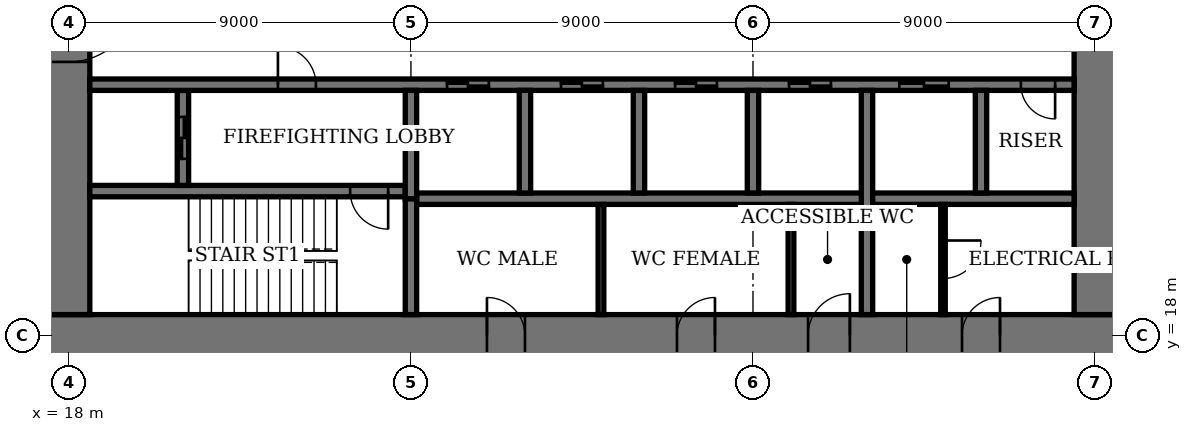
"""IFC4 building model, lengths in metres.
Left out: names, types, materials, properties, quantities, classifications, styles, units other than length and angle.
Written with IfcOpenShell. Run it as: python <this file> out.ifc"""

import sys

from ifc_helpers import new_model, si_unit, direction, frame, frame_2d, origin, place, context, subcontext, project, spatial, rectangle, extrude, element, fill, save


model = new_model("IFC4")
c1 = context("Model", 3, precision=1e-05, world=origin(), true_north=direction((0.0, 1.0)))
c2 = subcontext(c1, "Body", "Model", "MODEL_VIEW")
j1 = project(units=[si_unit("LENGTHUNIT", "METRE"), si_unit("PLANEANGLEUNIT", "RADIAN")], contexts=[c1])
p1 = place(None, origin())
s1 = spatial("IfcSite", under=j1, at=p1, CompositionType="ELEMENT")
p2 = place(p1, origin())
s2 = spatial("IfcBuilding", under=s1, at=p2, CompositionType="ELEMENT")
p3 = place(p2, frame((0.0, 0.0, 27.8)))
s3 = spatial("IfcBuildingStorey", under=s2, at=p3, CompositionType="ELEMENT", Elevation=27.8)
p4 = place(p3, frame((17.45, 18.0, 0.0), z_axis=(0.0, 0.0, 1.0), x_axis=(1.0, 0.0, 0.0)))
e1 = element("IfcWall", 1, at=p4, inside=s3, PredefinedType="SHEAR", context=c2, shape_type="SweptSolid", body=[
    extrude(rectangle(XDim=28.1, YDim=1.1, at=frame_2d((14.05, 0.0))), origin(), (0.0, 0.0, 1.0), 4.0),
])
p5 = place(p4, frame((11.55, 0.0, 0.0)))
e2 = element("IfcOpeningElement", 2, at=p5, cuts=e1, PredefinedType="OPENING", context=c2, shape_type="SweptSolid", body=[
    extrude(rectangle(XDim=1.0, YDim=2.4, at=frame_2d((0.5, 1.2))), frame((0.0, 0.56, 0.0), z_axis=(0.0, -1.0, 0.0), x_axis=(1.0, 0.0, 0.0)), (0.0, 0.0, 1.0), 1.12),
])
p6 = place(p4, frame((16.55, 0.0, 0.0)))
e3 = element("IfcOpeningElement", 3, at=p6, cuts=e1, PredefinedType="OPENING", context=c2, shape_type="SweptSolid", body=[
    extrude(rectangle(XDim=1.0, YDim=2.4, at=frame_2d((0.5, 1.2))), frame((0.0, 0.56, 0.0), z_axis=(0.0, -1.0, 0.0), x_axis=(1.0, 0.0, 0.0)), (0.0, 0.0, 1.0), 1.12),
])
p7 = place(p4, frame((20.0, 0.0, 0.0)))
e4 = element("IfcOpeningElement", 4, at=p7, cuts=e1, PredefinedType="OPENING", context=c2, shape_type="SweptSolid", body=[
    extrude(rectangle(XDim=1.1, YDim=2.4, at=frame_2d((0.55, 1.2))), frame((0.0, 0.56, 0.0), z_axis=(0.0, -1.0, 0.0), x_axis=(1.0, 0.0, 0.0)), (0.0, 0.0, 1.0), 1.12),
])
p8 = place(p4, frame((24.05, 0.0, 0.0)))
e5 = element("IfcOpeningElement", 5, at=p8, cuts=e1, PredefinedType="OPENING", context=c2, shape_type="SweptSolid", body=[
    extrude(rectangle(XDim=1.0, YDim=2.4, at=frame_2d((0.5, 1.2))), frame((0.0, 0.56, 0.0), z_axis=(0.0, -1.0, 0.0), x_axis=(1.0, 0.0, 0.0)), (0.0, 0.0, 1.0), 1.12),
])
p9 = place(p3, frame((18.0, 35.45, 0.0), z_axis=(0.0, 0.0, 1.0), x_axis=(0.0, -1.0, 0.0)))
e6 = element("IfcWall", 6, at=p9, inside=s3, PredefinedType="SHEAR", context=c2, shape_type="SweptSolid", body=[
    extrude(rectangle(XDim=16.9, YDim=1.1, at=frame_2d((8.45, 0.0))), origin(), (0.0, 0.0, 1.0), 4.0),
])
p10 = place(p9, frame((8.45, 0.0, 0.0)))
e7 = element("IfcOpeningElement", 7, at=p10, cuts=e6, PredefinedType="OPENING", context=c2, shape_type="SweptSolid", body=[
    extrude(rectangle(XDim=1.8, YDim=2.4, at=frame_2d((0.9, 1.2))), frame((0.0, 0.56, 0.0), z_axis=(0.0, -1.0, 0.0), x_axis=(1.0, 0.0, 0.0)), (0.0, 0.0, 1.0), 1.12),
])
p11 = place(p3, frame((45.0, 18.55, 0.0), z_axis=(0.0, 0.0, 1.0), x_axis=(0.0, 1.0, 0.0)))
e8 = element("IfcWall", 8, at=p11, inside=s3, PredefinedType="SHEAR", context=c2, shape_type="SweptSolid", body=[
    extrude(rectangle(XDim=16.9, YDim=1.1, at=frame_2d((8.45, 0.0))), origin(), (0.0, 0.0, 1.0), 4.0),
])
p12 = place(p11, frame((8.45, 0.0, 0.0)))
e9 = element("IfcOpeningElement", 9, at=p12, cuts=e8, PredefinedType="OPENING", context=c2, shape_type="SweptSolid", body=[
    extrude(rectangle(XDim=1.8, YDim=2.4, at=frame_2d((0.9, 1.2))), frame((0.0, 0.56, 0.0), z_axis=(0.0, -1.0, 0.0), x_axis=(1.0, 0.0, 0.0)), (0.0, 0.0, 1.0), 1.12),
])
p13 = place(p3, frame((18.55, 21.8, 0.0), z_axis=(0.0, 0.0, 1.0), x_axis=(1.0, 0.0, 0.0)))
e10 = element("IfcWall", 10, at=p13, inside=s3, PredefinedType="SHEAR", context=c2, shape_type="SweptSolid", body=[
    extrude(rectangle(XDim=8.3, YDim=0.3, at=frame_2d((4.15, 0.0))), origin(), (0.0, 0.0, 1.0), 4.0),
])
p14 = place(p13, frame((6.85, 0.0, 0.0)))
e11 = element("IfcOpeningElement", 11, at=p14, cuts=e10, PredefinedType="OPENING", context=c2, shape_type="SweptSolid", body=[
    extrude(rectangle(XDim=1.0, YDim=2.4, at=frame_2d((0.5, 1.2))), frame((0.0, 0.16, 0.0), z_axis=(0.0, -1.0, 0.0), x_axis=(1.0, 0.0, 0.0)), (0.0, 0.0, 1.0), 0.32),
])
p15 = place(p3, frame((27.0, 18.55, 0.0), z_axis=(0.0, 0.0, 1.0), x_axis=(0.0, 1.0, 0.0)))
e12 = element("IfcWall", 12, at=p15, inside=s3, PredefinedType="SHEAR", context=c2, shape_type="SweptSolid", body=[
    extrude(rectangle(XDim=3.05, YDim=0.3, at=frame_2d((1.525, 0.0))), origin(), (0.0, 0.0, 1.0), 4.0),
])
p16 = place(p3, frame((21.0, 21.95, 0.0), z_axis=(0.0, 0.0, 1.0), x_axis=(0.0, 1.0, 0.0)))
e13 = element("IfcWall", 13, at=p16, inside=s3, PredefinedType="SHEAR", context=c2, shape_type="SweptSolid", body=[
    extrude(rectangle(XDim=2.5, YDim=0.3, at=frame_2d((1.25, 0.0))), origin(), (0.0, 0.0, 1.0), 4.0),
])
p17 = place(p16, frame((0.7, 0.0, 0.0)))
e14 = element("IfcOpeningElement", 14, at=p17, cuts=e13, PredefinedType="OPENING", context=c2, shape_type="SweptSolid", body=[
    extrude(rectangle(XDim=1.1, YDim=2.4, at=frame_2d((0.55, 1.2))), frame((0.0, 0.16, 0.0), z_axis=(0.0, -1.0, 0.0), x_axis=(1.0, 0.0, 0.0)), (0.0, 0.0, 1.0), 0.32),
])
p18 = place(p3, frame((18.55, 24.6, 0.0), z_axis=(0.0, 0.0, 1.0), x_axis=(1.0, 0.0, 0.0)))
e15 = element("IfcWall", 15, at=p18, inside=s3, PredefinedType="SHEAR", context=c2, shape_type="SweptSolid", body=[
    extrude(rectangle(XDim=25.9, YDim=0.3, at=frame_2d((12.95, 0.0))), origin(), (0.0, 0.0, 1.0), 4.0),
])
p19 = place(p18, frame((4.95, 0.0, 0.0)))
e16 = element("IfcOpeningElement", 16, at=p19, cuts=e15, PredefinedType="OPENING", context=c2, shape_type="SweptSolid", body=[
    extrude(rectangle(XDim=1.0, YDim=2.4, at=frame_2d((0.5, 1.2))), frame((0.0, 0.16, 0.0), z_axis=(0.0, -1.0, 0.0), x_axis=(1.0, 0.0, 0.0)), (0.0, 0.0, 1.0), 0.32),
])
p20 = place(p18, frame((24.5, 0.0, 0.0)))
e17 = element("IfcOpeningElement", 17, at=p20, cuts=e15, PredefinedType="OPENING", context=c2, shape_type="SweptSolid", body=[
    extrude(rectangle(XDim=0.9, YDim=2.1, at=frame_2d((0.45, 1.05))), frame((0.0, 0.16, 0.0), z_axis=(0.0, -1.0, 0.0), x_axis=(1.0, 0.0, 0.0)), (0.0, 0.0, 1.0), 0.32),
])
p21 = place(p18, frame((9.4, 0.0, 0.0)))
e18 = element("IfcOpeningElement", 18, at=p21, cuts=e15, PredefinedType="OPENING", context=c2, shape_type="SweptSolid", body=[
    extrude(rectangle(XDim=1.1, YDim=2.4, at=frame_2d((0.55, 1.2))), frame((0.0, 0.16, 0.0), z_axis=(0.0, -1.0, 0.0), x_axis=(1.0, 0.0, 0.0)), (0.0, 0.0, 1.0), 0.32),
])
p22 = place(p18, frame((12.4, 0.0, 0.0)))
e19 = element("IfcOpeningElement", 19, at=p22, cuts=e15, PredefinedType="OPENING", context=c2, shape_type="SweptSolid", body=[
    extrude(rectangle(XDim=1.1, YDim=2.4, at=frame_2d((0.55, 1.2))), frame((0.0, 0.16, 0.0), z_axis=(0.0, -1.0, 0.0), x_axis=(1.0, 0.0, 0.0)), (0.0, 0.0, 1.0), 0.32),
])
p23 = place(p18, frame((15.4, 0.0, 0.0)))
e20 = element("IfcOpeningElement", 20, at=p23, cuts=e15, PredefinedType="OPENING", context=c2, shape_type="SweptSolid", body=[
    extrude(rectangle(XDim=1.1, YDim=2.4, at=frame_2d((0.55, 1.2))), frame((0.0, 0.16, 0.0), z_axis=(0.0, -1.0, 0.0), x_axis=(1.0, 0.0, 0.0)), (0.0, 0.0, 1.0), 0.32),
])
p24 = place(p18, frame((18.4, 0.0, 0.0)))
e21 = element("IfcOpeningElement", 21, at=p24, cuts=e15, PredefinedType="OPENING", context=c2, shape_type="SweptSolid", body=[
    extrude(rectangle(XDim=1.1, YDim=2.4, at=frame_2d((0.55, 1.2))), frame((0.0, 0.16, 0.0), z_axis=(0.0, -1.0, 0.0), x_axis=(1.0, 0.0, 0.0)), (0.0, 0.0, 1.0), 0.32),
])
p25 = place(p18, frame((21.3, 0.0, 0.0)))
e22 = element("IfcOpeningElement", 22, at=p25, cuts=e15, PredefinedType="OPENING", context=c2, shape_type="SweptSolid", body=[
    extrude(rectangle(XDim=1.3, YDim=2.4, at=frame_2d((0.65, 1.2))), frame((0.0, 0.16, 0.0), z_axis=(0.0, -1.0, 0.0), x_axis=(1.0, 0.0, 0.0)), (0.0, 0.0, 1.0), 0.32),
])
p26 = place(p3, frame((27.15, 21.6, 0.0), z_axis=(0.0, 0.0, 1.0), x_axis=(1.0, 0.0, 0.0)))
e23 = element("IfcWall", 23, at=p26, inside=s3, PredefinedType="SHEAR", context=c2, shape_type="SweptSolid", body=[
    extrude(rectangle(XDim=17.3, YDim=0.3, at=frame_2d((8.65, 0.0))), origin(), (0.0, 0.0, 1.0), 4.0),
])
for number, where, z_axis, x_axis in (
    (24, (30.0, 21.75, 0.0), (0.0, 0.0, 1.0), (0.0, 1.0, 0.0)),
    (25, (33.0, 21.75, 0.0), (0.0, 0.0, 1.0), (0.0, 1.0, 0.0)),
    (26, (36.0, 21.75, 0.0), (0.0, 0.0, 1.0), (0.0, 1.0, 0.0)),
):
    element("IfcWall", number, at=place(p3, frame(where, z_axis=z_axis, x_axis=x_axis)), inside=s3, PredefinedType="SHEAR", context=c2, shape_type="SweptSolid", body=[
        extrude(rectangle(XDim=2.7, YDim=0.3, at=frame_2d((1.35, 0.0))), origin(), (0.0, 0.0, 1.0), 4.0),
    ])
p27 = place(p3, frame((39.0, 18.55, 0.0), z_axis=(0.0, 0.0, 1.0), x_axis=(0.0, 1.0, 0.0)))
e27 = element("IfcWall", 27, at=p27, inside=s3, PredefinedType="SHEAR", context=c2, shape_type="SweptSolid", body=[
    extrude(rectangle(XDim=5.9, YDim=0.3, at=frame_2d((2.95, 0.0))), origin(), (0.0, 0.0, 1.0), 4.0),
])
p28 = place(p3, frame((42.0, 21.75, 0.0), z_axis=(0.0, 0.0, 1.0), x_axis=(0.0, 1.0, 0.0)))
e28 = element("IfcWall", 28, at=p28, inside=s3, PredefinedType="SHEAR", context=c2, shape_type="SweptSolid", body=[
    extrude(rectangle(XDim=2.7, YDim=0.3, at=frame_2d((1.35, 0.0))), origin(), (0.0, 0.0, 1.0), 4.0),
])
p29 = place(p3, frame((27.0, 21.6, 0.0), z_axis=(0.0, 0.0, 1.0), x_axis=(0.0, 1.0, 0.0)))
e29 = element("IfcWall", 29, at=p29, inside=s3, PredefinedType="SHEAR", context=c2, shape_type="SweptSolid", body=[
    extrude(rectangle(XDim=2.85, YDim=0.3, at=frame_2d((1.425, 0.0))), origin(), (0.0, 0.0, 1.0), 4.0),
])
for number, where, z_axis, x_axis in (
    (30, (32.0, 18.55, 0.0), (0.0, 0.0, 1.0), (0.0, 1.0, 0.0)),
    (31, (37.0, 18.55, 0.0), (0.0, 0.0, 1.0), (0.0, 1.0, 0.0)),
):
    element("IfcWall", number, at=place(p3, frame(where, z_axis=z_axis, x_axis=x_axis)), inside=s3, PredefinedType="PARTITIONING", context=c2, shape_type="SweptSolid", body=[
        extrude(rectangle(XDim=2.9, YDim=0.15, at=frame_2d((1.45, 0.0))), origin(), (0.0, 0.0, 1.0), 3.75),
    ])
p30 = place(p3, frame((41.0, 18.55, 0.0), z_axis=(0.0, 0.0, 1.0), x_axis=(0.0, 1.0, 0.0)))
e32 = element("IfcWall", 32, at=p30, inside=s3, PredefinedType="PARTITIONING", context=c2, shape_type="SweptSolid", body=[
    extrude(rectangle(XDim=2.9, YDim=0.12, at=frame_2d((1.45, 0.0))), origin(), (0.0, 0.0, 1.0), 3.75),
])
p31 = place(p30, frame((0.95, 0.0, 0.0)))
e33 = element("IfcOpeningElement", 33, at=p31, cuts=e32, PredefinedType="OPENING", context=c2, shape_type="SweptSolid", body=[
    extrude(rectangle(XDim=1.0, YDim=2.4, at=frame_2d((0.5, 1.2))), frame((0.0, 0.07, 0.0), z_axis=(0.0, -1.0, 0.0), x_axis=(1.0, 0.0, 0.0)), (0.0, 0.0, 1.0), 0.14),
])
p32 = place(p10, origin())
e34 = element("IfcDoor", 34, at=p32, inside=s3, OperationType="DOUBLE_DOOR_DOUBLE_SWING", PredefinedType="DOOR", context=c2, shape_type="SweptSolid", body=[
    extrude(rectangle(XDim=1.8, YDim=2.4, at=frame_2d((0.9, 1.2))), frame((0.0, 0.03, 0.0), z_axis=(0.0, -1.0, 0.0), x_axis=(1.0, 0.0, 0.0)), (0.0, 0.0, 1.0), 0.06),
    extrude(rectangle(XDim=0.04, YDim=2.4, at=frame_2d((0.02, 1.2))), frame((0.0, 0.55, 0.0), z_axis=(0.0, -1.0, 0.0), x_axis=(1.0, 0.0, 0.0)), (0.0, 0.0, 1.0), 1.1),
    extrude(rectangle(XDim=0.04, YDim=2.4, at=frame_2d((1.78, 1.2))), frame((0.0, 0.55, 0.0), z_axis=(0.0, -1.0, 0.0), x_axis=(1.0, 0.0, 0.0)), (0.0, 0.0, 1.0), 1.1),
    extrude(rectangle(XDim=1.8, YDim=0.04, at=frame_2d((0.9, 2.38))), frame((0.0, 0.55, 0.0), z_axis=(0.0, -1.0, 0.0), x_axis=(1.0, 0.0, 0.0)), (0.0, 0.0, 1.0), 1.1),
])
fill(e7, e34)
p33 = place(p5, origin())
e35 = element("IfcDoor", 35, at=p33, inside=s3, OperationType="SINGLE_SWING_RIGHT", PredefinedType="DOOR", context=c2, shape_type="SweptSolid", body=[
    extrude(rectangle(XDim=1.0, YDim=2.4, at=frame_2d((0.5, 1.2))), frame((0.0, 0.025, 0.0), z_axis=(0.0, -1.0, 0.0), x_axis=(1.0, 0.0, 0.0)), (0.0, 0.0, 1.0), 0.05),
    extrude(rectangle(XDim=0.04, YDim=2.4, at=frame_2d((0.02, 1.2))), frame((0.0, 0.4, 0.0), z_axis=(0.0, -1.0, 0.0), x_axis=(1.0, 0.0, 0.0)), (0.0, 0.0, 1.0), 0.8),
    extrude(rectangle(XDim=0.04, YDim=2.4, at=frame_2d((0.98, 1.2))), frame((0.0, 0.4, 0.0), z_axis=(0.0, -1.0, 0.0), x_axis=(1.0, 0.0, 0.0)), (0.0, 0.0, 1.0), 0.8),
    extrude(rectangle(XDim=1.0, YDim=0.04, at=frame_2d((0.5, 2.38))), frame((0.0, 0.4, 0.0), z_axis=(0.0, -1.0, 0.0), x_axis=(1.0, 0.0, 0.0)), (0.0, 0.0, 1.0), 0.8),
])
fill(e2, e35)
p34 = place(p6, origin())
e36 = element("IfcDoor", 36, at=p34, inside=s3, OperationType="SINGLE_SWING_LEFT", PredefinedType="DOOR", context=c2, shape_type="SweptSolid", body=[
    extrude(rectangle(XDim=1.0, YDim=2.4, at=frame_2d((0.5, 1.2))), frame((0.0, 0.025, 0.0), z_axis=(0.0, -1.0, 0.0), x_axis=(1.0, 0.0, 0.0)), (0.0, 0.0, 1.0), 0.05),
    extrude(rectangle(XDim=0.04, YDim=2.4, at=frame_2d((0.02, 1.2))), frame((0.0, 0.4, 0.0), z_axis=(0.0, -1.0, 0.0), x_axis=(1.0, 0.0, 0.0)), (0.0, 0.0, 1.0), 0.8),
    extrude(rectangle(XDim=0.04, YDim=2.4, at=frame_2d((0.98, 1.2))), frame((0.0, 0.4, 0.0), z_axis=(0.0, -1.0, 0.0), x_axis=(1.0, 0.0, 0.0)), (0.0, 0.0, 1.0), 0.8),
    extrude(rectangle(XDim=1.0, YDim=0.04, at=frame_2d((0.5, 2.38))), frame((0.0, 0.4, 0.0), z_axis=(0.0, -1.0, 0.0), x_axis=(1.0, 0.0, 0.0)), (0.0, 0.0, 1.0), 0.8),
])
fill(e3, e36)
p35 = place(p7, origin())
e37 = element("IfcDoor", 37, at=p35, inside=s3, OperationType="SINGLE_SWING_LEFT", PredefinedType="DOOR", context=c2, shape_type="SweptSolid", body=[
    extrude(rectangle(XDim=1.1, YDim=2.4, at=frame_2d((0.55, 1.2))), frame((0.0, 0.025, 0.0), z_axis=(0.0, -1.0, 0.0), x_axis=(1.0, 0.0, 0.0)), (0.0, 0.0, 1.0), 0.05),
    extrude(rectangle(XDim=0.04, YDim=2.4, at=frame_2d((0.02, 1.2))), frame((0.0, 0.44, 0.0), z_axis=(0.0, -1.0, 0.0), x_axis=(1.0, 0.0, 0.0)), (0.0, 0.0, 1.0), 0.88),
    extrude(rectangle(XDim=0.04, YDim=2.4, at=frame_2d((1.08, 1.2))), frame((0.0, 0.44, 0.0), z_axis=(0.0, -1.0, 0.0), x_axis=(1.0, 0.0, 0.0)), (0.0, 0.0, 1.0), 0.88),
    extrude(rectangle(XDim=1.1, YDim=0.04, at=frame_2d((0.55, 2.38))), frame((0.0, 0.44, 0.0), z_axis=(0.0, -1.0, 0.0), x_axis=(1.0, 0.0, 0.0)), (0.0, 0.0, 1.0), 0.88),
])
fill(e4, e37)
p36 = place(p8, origin())
e38 = element("IfcDoor", 38, at=p36, inside=s3, OperationType="SINGLE_SWING_LEFT", PredefinedType="DOOR", context=c2, shape_type="SweptSolid", body=[
    extrude(rectangle(XDim=1.0, YDim=2.4, at=frame_2d((0.5, 1.2))), frame((0.0, 0.025, 0.0), z_axis=(0.0, -1.0, 0.0), x_axis=(1.0, 0.0, 0.0)), (0.0, 0.0, 1.0), 0.05),
    extrude(rectangle(XDim=0.04, YDim=2.4, at=frame_2d((0.02, 1.2))), frame((0.0, 0.4, 0.0), z_axis=(0.0, -1.0, 0.0), x_axis=(1.0, 0.0, 0.0)), (0.0, 0.0, 1.0), 0.8),
    extrude(rectangle(XDim=0.04, YDim=2.4, at=frame_2d((0.98, 1.2))), frame((0.0, 0.4, 0.0), z_axis=(0.0, -1.0, 0.0), x_axis=(1.0, 0.0, 0.0)), (0.0, 0.0, 1.0), 0.8),
    extrude(rectangle(XDim=1.0, YDim=0.04, at=frame_2d((0.5, 2.38))), frame((0.0, 0.4, 0.0), z_axis=(0.0, -1.0, 0.0), x_axis=(1.0, 0.0, 0.0)), (0.0, 0.0, 1.0), 0.8),
])
fill(e5, e38)
p37 = place(p14, origin())
e39 = element("IfcDoor", 39, at=p37, inside=s3, OperationType="SINGLE_SWING_RIGHT", PredefinedType="DOOR", context=c2, shape_type="SweptSolid", body=[
    extrude(rectangle(XDim=1.0, YDim=2.4, at=frame_2d((0.5, 1.2))), frame((0.0, 0.03, 0.0), z_axis=(0.0, -1.0, 0.0), x_axis=(1.0, 0.0, 0.0)), (0.0, 0.0, 1.0), 0.06),
])
fill(e11, e39)
p38 = place(p19, origin())
e40 = element("IfcDoor", 40, at=p38, inside=s3, OperationType="SINGLE_SWING_RIGHT", PredefinedType="DOOR", context=c2, shape_type="SweptSolid", body=[
    extrude(rectangle(XDim=1.0, YDim=2.4, at=frame_2d((0.5, 1.2))), frame((0.0, 0.03, 0.0), z_axis=(0.0, -1.0, 0.0), x_axis=(1.0, 0.0, 0.0)), (0.0, 0.0, 1.0), 0.06),
])
fill(e16, e40)
p39 = place(p20, origin())
e41 = element("IfcDoor", 41, at=p39, inside=s3, OperationType="SINGLE_SWING_RIGHT", PredefinedType="DOOR", context=c2, shape_type="SweptSolid", body=[
    extrude(rectangle(XDim=0.9, YDim=2.1, at=frame_2d((0.45, 1.05))), frame((0.0, 0.03, 0.0), z_axis=(0.0, -1.0, 0.0), x_axis=(1.0, 0.0, 0.0)), (0.0, 0.0, 1.0), 0.06),
])
fill(e17, e41)
p40 = place(p31, origin())
e42 = element("IfcDoor", 42, at=p40, inside=s3, OperationType="SINGLE_SWING_RIGHT", PredefinedType="DOOR", context=c2, shape_type="SweptSolid", body=[
    extrude(rectangle(XDim=1.0, YDim=2.4, at=frame_2d((0.5, 1.2))), frame((0.0, 0.03, 0.0), z_axis=(0.0, -1.0, 0.0), x_axis=(1.0, 0.0, 0.0)), (0.0, 0.0, 1.0), 0.06),
])
fill(e33, e42)
p41 = place(p21, origin())
e43 = element("IfcDoor", 43, at=p41, inside=s3, OperationType="DOUBLE_DOOR_SLIDING", PredefinedType="DOOR", context=c2, shape_type="SweptSolid", body=[
    extrude(rectangle(XDim=1.1, YDim=2.4, at=frame_2d((0.55, 1.2))), frame((0.0, 0.02, 0.0), z_axis=(0.0, -1.0, 0.0), x_axis=(1.0, 0.0, 0.0)), (0.0, 0.0, 1.0), 0.04),
])
fill(e18, e43)
p42 = place(p22, origin())
e44 = element("IfcDoor", 44, at=p42, inside=s3, OperationType="DOUBLE_DOOR_SLIDING", PredefinedType="DOOR", context=c2, shape_type="SweptSolid", body=[
    extrude(rectangle(XDim=1.1, YDim=2.4, at=frame_2d((0.55, 1.2))), frame((0.0, 0.02, 0.0), z_axis=(0.0, -1.0, 0.0), x_axis=(1.0, 0.0, 0.0)), (0.0, 0.0, 1.0), 0.04),
])
fill(e19, e44)
p43 = place(p23, origin())
e45 = element("IfcDoor", 45, at=p43, inside=s3, OperationType="DOUBLE_DOOR_SLIDING", PredefinedType="DOOR", context=c2, shape_type="SweptSolid", body=[
    extrude(rectangle(XDim=1.1, YDim=2.4, at=frame_2d((0.55, 1.2))), frame((0.0, 0.02, 0.0), z_axis=(0.0, -1.0, 0.0), x_axis=(1.0, 0.0, 0.0)), (0.0, 0.0, 1.0), 0.04),
])
fill(e20, e45)
p44 = place(p24, origin())
e46 = element("IfcDoor", 46, at=p44, inside=s3, OperationType="DOUBLE_DOOR_SLIDING", PredefinedType="DOOR", context=c2, shape_type="SweptSolid", body=[
    extrude(rectangle(XDim=1.1, YDim=2.4, at=frame_2d((0.55, 1.2))), frame((0.0, 0.02, 0.0), z_axis=(0.0, -1.0, 0.0), x_axis=(1.0, 0.0, 0.0)), (0.0, 0.0, 1.0), 0.04),
])
fill(e21, e46)
p45 = place(p25, origin())
e47 = element("IfcDoor", 47, at=p45, inside=s3, OperationType="DOUBLE_DOOR_SLIDING", PredefinedType="DOOR", context=c2, shape_type="SweptSolid", body=[
    extrude(rectangle(XDim=1.3, YDim=2.4, at=frame_2d((0.65, 1.2))), frame((0.0, 0.02, 0.0), z_axis=(0.0, -1.0, 0.0), x_axis=(1.0, 0.0, 0.0)), (0.0, 0.0, 1.0), 0.04),
])
fill(e22, e47)
p46 = place(p17, origin())
e48 = element("IfcDoor", 48, at=p46, inside=s3, OperationType="DOUBLE_DOOR_SLIDING", PredefinedType="DOOR", context=c2, shape_type="SweptSolid", body=[
    extrude(rectangle(XDim=1.1, YDim=2.4, at=frame_2d((0.55, 1.2))), frame((0.0, 0.03, 0.0), z_axis=(0.0, -1.0, 0.0), x_axis=(1.0, 0.0, 0.0)), (0.0, 0.0, 1.0), 0.06),
])
fill(e14, e48)
save(model, sys.argv[1])
